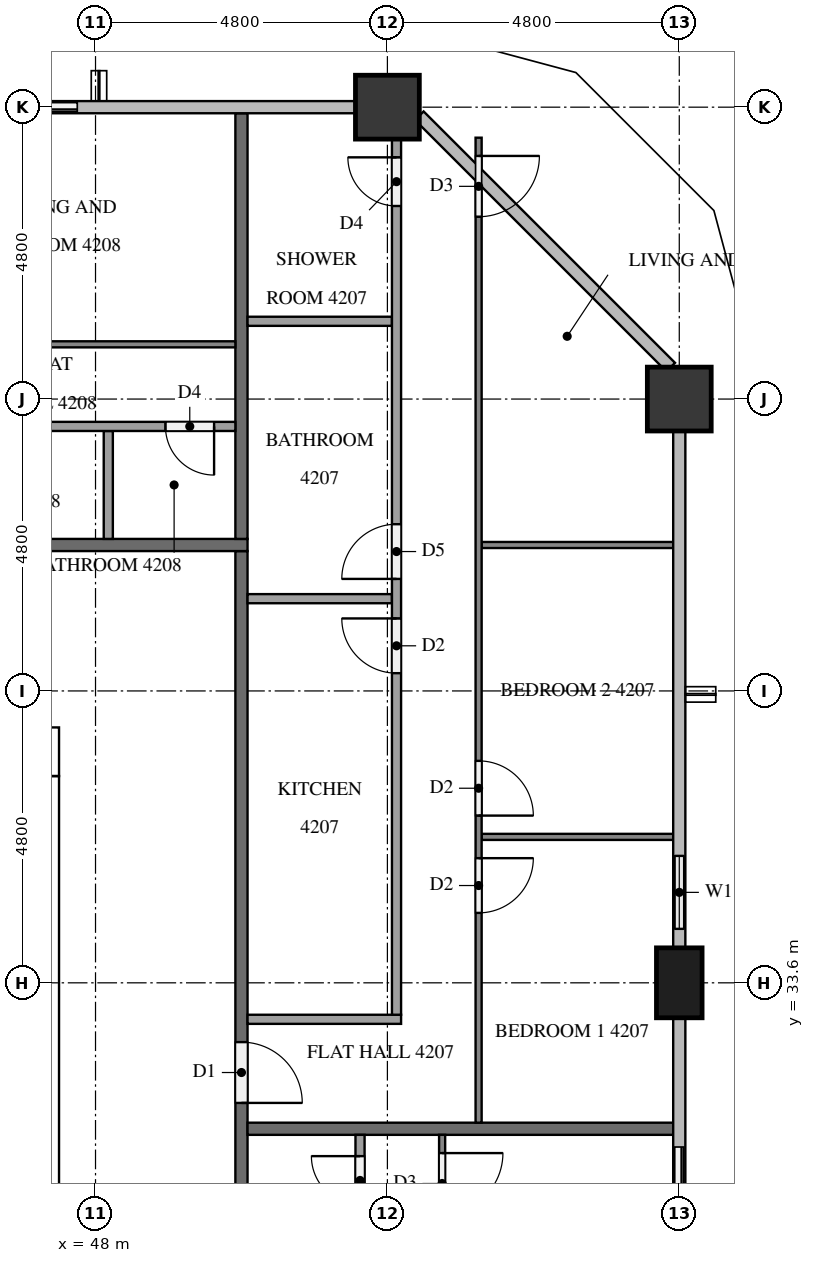
"""IFC4 building model, lengths in metres.
Left out: names, types, materials, properties, quantities, classifications, styles, units other than length and angle.
Written with IfcOpenShell. Run it as: python <this file> out.ifc"""

import sys

from ifc_helpers import new_model, si_unit, direction, frame, frame_2d, origin, origin_2d, place, context, subcontext, project, spatial, rectangle, extrude, element, fill, save


model = new_model("IFC4")
c1 = context("Model", 3, precision=1e-05, world=origin(), true_north=direction((0.0, 1.0)))
c2 = subcontext(c1, "Body", "Model", "MODEL_VIEW")
j1 = project(units=[si_unit("LENGTHUNIT", "METRE"), si_unit("PLANEANGLEUNIT", "RADIAN")], contexts=[c1])
p1 = place(None, origin())
s1 = spatial("IfcSite", under=j1, at=p1, CompositionType="ELEMENT")
p2 = place(p1, origin())
s2 = spatial("IfcBuilding", under=s1, at=p2, CompositionType="ELEMENT")
p3 = place(p2, frame((0.0, 0.0, 163.0)))
s3 = spatial("IfcBuildingStorey", under=s2, at=p3, CompositionType="ELEMENT", Elevation=163.0)
p4 = place(p3, frame((15.0, 37.4, 0.0), z_axis=(0.0, 0.0, 1.0), x_axis=(1.0, 0.0, 0.0)))
e1 = element("IfcWall", 1, at=p4, inside=s3, PredefinedType="SHEAR", context=c2, shape_type="SweptSolid", body=[
    extrude(rectangle(XDim=32.4, YDim=0.8, at=frame_2d((16.2, 0.0))), origin(), (0.0, 0.0, 1.0), 3.2),
])
p5 = place(p4, frame((15.3, 0.0, 0.0)))
e2 = element("IfcOpeningElement", 2, at=p5, cuts=e1, PredefinedType="OPENING", context=c2, shape_type="SweptSolid", body=[
    extrude(rectangle(XDim=1.8, YDim=2.1, at=frame_2d((0.9, 1.05))), frame((0.0, 0.41, 0.0), z_axis=(0.0, -1.0, 0.0), x_axis=(1.0, 0.0, 0.0)), (0.0, 0.0, 1.0), 0.82),
])
p6 = place(p4, frame((1.51, 0.0, 0.0)))
e3 = element("IfcOpeningElement", 3, at=p6, cuts=e1, PredefinedType="OPENING", context=c2, shape_type="SweptSolid", body=[
    extrude(rectangle(XDim=1.0, YDim=2.1, at=frame_2d((0.5, 1.05))), frame((0.0, 0.41, 0.0), z_axis=(0.0, -1.0, 0.0), x_axis=(1.0, 0.0, 0.0)), (0.0, 0.0, 1.0), 0.82),
])
p7 = place(p4, frame((5.11, 0.0, 0.0)))
e4 = element("IfcOpeningElement", 4, at=p7, cuts=e1, PredefinedType="OPENING", context=c2, shape_type="SweptSolid", body=[
    extrude(rectangle(XDim=1.0, YDim=2.1, at=frame_2d((0.5, 1.05))), frame((0.0, 0.41, 0.0), z_axis=(0.0, -1.0, 0.0), x_axis=(1.0, 0.0, 0.0)), (0.0, 0.0, 1.0), 0.82),
])
p8 = place(p3, frame((47.0, 15.8, 0.0), z_axis=(0.0, 0.0, 1.0), x_axis=(0.0, 1.0, 0.0)))
e5 = element("IfcWall", 5, at=p8, inside=s3, PredefinedType="SHEAR", context=c2, shape_type="SweptSolid", body=[
    extrude(rectangle(XDim=21.2, YDim=0.8, at=frame_2d((10.6, 0.0))), origin(), (0.0, 0.0, 1.0), 3.2),
])
p9 = place(p8, frame((10.3, 0.0, 0.0)))
e6 = element("IfcOpeningElement", 6, at=p9, cuts=e5, PredefinedType="OPENING", context=c2, shape_type="SweptSolid", body=[
    extrude(rectangle(XDim=1.2, YDim=2.1, at=frame_2d((0.6, 1.05))), frame((0.0, 0.41, 0.0), z_axis=(0.0, -1.0, 0.0), x_axis=(1.0, 0.0, 0.0)), (0.0, 0.0, 1.0), 0.82),
])
p10 = place(p3, frame((57.6, 33.6, 0.0), z_axis=(0.0, 0.0, 1.0), x_axis=(0.0, 1.0, 0.0)))
e7 = element("IfcColumn", 7, at=p10, inside=s3, PredefinedType="COLUMN", context=c2, shape_type="SweptSolid", body=[
    extrude(rectangle(XDim=1.15, YDim=0.75, at=origin_2d()), origin(), (0.0, 0.0, 1.0), 3.2),
])
for number, where, z_axis, x_axis in (
    (8, (57.6, 43.2, 0.0), (0.0, 0.0, 1.0), (1.0, 0.0, 0.0)),
    (9, (52.8, 48.0, 0.0), (0.0, 0.0, 1.0), (1.0, 0.0, 0.0)),
):
    element("IfcColumn", number, at=place(p3, frame(where, z_axis=z_axis, x_axis=x_axis)), inside=s3, PredefinedType="COLUMN", context=c2, shape_type="SweptSolid", body=[
        extrude(rectangle(XDim=1.05, YDim=1.05, at=origin_2d()), origin(), (0.0, 0.0, 1.0), 3.2),
    ])
p11 = place(p3, frame((57.6, 28.8, 0.0), z_axis=(0.0, 0.0, 1.0), x_axis=(0.0, 1.0, 0.0)))
e10 = element("IfcWall", 10, at=p11, inside=s3, PredefinedType="SOLIDWALL", context=c2, shape_type="SweptSolid", body=[
    extrude(rectangle(XDim=2.4, YDim=0.15, at=frame_2d((1.2, 0.0))), origin(), (0.0, 0.0, 1.0), 3.2),
])
p12 = place(p11, frame((0.3, 0.0, 0.0)))
e11 = element("IfcOpeningElement", 11, at=p12, cuts=e10, PredefinedType="OPENING", context=c2, shape_type="SweptSolid", body=[
    extrude(rectangle(XDim=1.8, YDim=2.4, at=frame_2d((0.9, 1.2))), frame((0.0, 0.085, 0.0), z_axis=(0.0, -1.0, 0.0), x_axis=(1.0, 0.0, 0.0)), (0.0, 0.0, 1.0), 0.17),
])
p13 = place(p3, frame((57.6, 34.175, 0.0), z_axis=(0.0, 0.0, 1.0), x_axis=(0.0, 1.0, 0.0)))
e12 = element("IfcWall", 12, at=p13, inside=s3, PredefinedType="SOLIDWALL", context=c2, shape_type="SweptSolid", body=[
    extrude(rectangle(XDim=1.825, YDim=0.15, at=frame_2d((0.913, 0.0))), origin(), (0.0, 0.0, 1.0), 3.2),
])
p14 = place(p13, frame((0.312, 0.0, 0.9)))
e13 = element("IfcOpeningElement", 13, at=p14, cuts=e12, PredefinedType="OPENING", context=c2, shape_type="SweptSolid", body=[
    extrude(rectangle(XDim=1.2, YDim=1.4, at=frame_2d((0.6, 0.7))), frame((0.0, 0.085, 0.0), z_axis=(0.0, -1.0, 0.0), x_axis=(1.0, 0.0, 0.0)), (0.0, 0.0, 1.0), 0.17),
])
p15 = place(p3, frame((48.0, 48.0, 0.0), z_axis=(0.0, 0.0, 1.0), x_axis=(-1.0, 0.0, 0.0)))
e14 = element("IfcWall", 14, at=p15, inside=s3, PredefinedType="SOLIDWALL", context=c2, shape_type="SweptSolid", body=[
    extrude(rectangle(XDim=2.4, YDim=0.15, at=frame_2d((1.2, 0.0))), origin(), (0.0, 0.0, 1.0), 3.2),
])
p16 = place(p15, frame((0.3, 0.0, 0.0)))
e15 = element("IfcOpeningElement", 15, at=p16, cuts=e14, PredefinedType="OPENING", context=c2, shape_type="SweptSolid", body=[
    extrude(rectangle(XDim=1.8, YDim=2.4, at=frame_2d((0.9, 1.2))), frame((0.0, 0.085, 0.0), z_axis=(0.0, -1.0, 0.0), x_axis=(1.0, 0.0, 0.0)), (0.0, 0.0, 1.0), 0.17),
])
p17 = place(p3, frame((50.4, 40.7, 0.0), z_axis=(0.0, 0.0, 1.0), x_axis=(0.0, -1.0, 0.0)))
e16 = element("IfcWall", 16, at=p17, inside=s3, PredefinedType="PARTITIONING", context=c2, shape_type="SweptSolid", body=[
    extrude(rectangle(XDim=28.6, YDim=0.2, at=frame_2d((14.3, 0.0))), origin(), (0.0, 0.0, 1.0), 3.2),
])
p18 = place(p17, frame((19.525, 0.0, 0.0)))
e17 = element("IfcOpeningElement", 17, at=p18, cuts=e16, PredefinedType="OPENING", context=c2, shape_type="SweptSolid", body=[
    extrude(rectangle(XDim=1.0, YDim=2.1, at=frame_2d((0.5, 1.05))), frame((0.0, 0.11, 0.0), z_axis=(0.0, -1.0, 0.0), x_axis=(1.0, 0.0, 0.0)), (0.0, 0.0, 1.0), 0.22),
])
p19 = place(p17, frame((17.675, 0.0, 0.0)))
e18 = element("IfcOpeningElement", 18, at=p19, cuts=e16, PredefinedType="OPENING", context=c2, shape_type="SweptSolid", body=[
    extrude(rectangle(XDim=1.0, YDim=2.1, at=frame_2d((0.5, 1.05))), frame((0.0, 0.11, 0.0), z_axis=(0.0, -1.0, 0.0), x_axis=(1.0, 0.0, 0.0)), (0.0, 0.0, 1.0), 0.22),
])
p20 = place(p17, frame((8.075, 0.0, 0.0)))
e19 = element("IfcOpeningElement", 19, at=p20, cuts=e16, PredefinedType="OPENING", context=c2, shape_type="SweptSolid", body=[
    extrude(rectangle(XDim=1.0, YDim=2.1, at=frame_2d((0.5, 1.05))), frame((0.0, 0.11, 0.0), z_axis=(0.0, -1.0, 0.0), x_axis=(1.0, 0.0, 0.0)), (0.0, 0.0, 1.0), 0.22),
])
p21 = place(p3, frame((11.9, 40.8, 0.0), z_axis=(0.0, 0.0, 1.0), x_axis=(1.0, 0.0, 0.0)))
e20 = element("IfcWall", 20, at=p21, inside=s3, PredefinedType="PARTITIONING", context=c2, shape_type="SweptSolid", body=[
    extrude(rectangle(XDim=38.6, YDim=0.2, at=frame_2d((19.3, 0.0))), origin(), (0.0, 0.0, 1.0), 3.2),
])
p22 = place(p21, frame((31.725, 0.0, 0.0)))
e21 = element("IfcOpeningElement", 21, at=p22, cuts=e20, PredefinedType="OPENING", context=c2, shape_type="SweptSolid", body=[
    extrude(rectangle(XDim=1.0, YDim=2.1, at=frame_2d((0.5, 1.05))), frame((0.0, 0.11, 0.0), z_axis=(0.0, -1.0, 0.0), x_axis=(1.0, 0.0, 0.0)), (0.0, 0.0, 1.0), 0.22),
])
p23 = place(p21, frame((17.325, 0.0, 0.0)))
e22 = element("IfcOpeningElement", 22, at=p23, cuts=e20, PredefinedType="OPENING", context=c2, shape_type="SweptSolid", body=[
    extrude(rectangle(XDim=1.0, YDim=2.1, at=frame_2d((0.5, 1.05))), frame((0.0, 0.11, 0.0), z_axis=(0.0, -1.0, 0.0), x_axis=(1.0, 0.0, 0.0)), (0.0, 0.0, 1.0), 0.22),
])
p24 = place(p21, frame((0.525, 0.0, 0.0)))
e23 = element("IfcOpeningElement", 23, at=p24, cuts=e20, PredefinedType="OPENING", context=c2, shape_type="SweptSolid", body=[
    extrude(rectangle(XDim=1.0, YDim=2.1, at=frame_2d((0.5, 1.05))), frame((0.0, 0.11, 0.0), z_axis=(0.0, -1.0, 0.0), x_axis=(1.0, 0.0, 0.0)), (0.0, 0.0, 1.0), 0.22),
])
for number, where, z_axis, x_axis in (
    (24, (50.5, 31.2, 0.0), (0.0, 0.0, 1.0), (1.0, 0.0, 0.0)),
    (25, (50.4, 40.9, 0.0), (0.0, 0.0, 1.0), (0.0, 1.0, 0.0)),
):
    element("IfcWall", number, at=place(p3, frame(where, z_axis=z_axis, x_axis=x_axis)), inside=s3, PredefinedType="PARTITIONING", context=c2, shape_type="SweptSolid", body=[
        extrude(rectangle(XDim=7.0, YDim=0.2, at=frame_2d((3.5, 0.0))), origin(), (0.0, 0.0, 1.0), 3.2),
    ])
p25 = place(p3, frame((53.7, 31.1, 0.0), z_axis=(0.0, 0.0, 1.0), x_axis=(0.0, -1.0, 0.0)))
e26 = element("IfcWall", 26, at=p25, inside=s3, PredefinedType="PARTITIONING", context=c2, shape_type="SweptSolid", body=[
    extrude(rectangle(XDim=9.4, YDim=0.1, at=frame_2d((4.7, 0.0))), origin(), (0.0, 0.0, 1.0), 3.2),
])
p26 = place(p25, frame((8.2, 0.0, 0.0)))
e27 = element("IfcOpeningElement", 27, at=p26, cuts=e26, PredefinedType="OPENING", context=c2, shape_type="SweptSolid", body=[
    extrude(rectangle(XDim=0.9, YDim=2.1, at=frame_2d((0.45, 1.05))), frame((0.0, 0.06, 0.0), z_axis=(0.0, -1.0, 0.0), x_axis=(1.0, 0.0, 0.0)), (0.0, 0.0, 1.0), 0.12),
])
p27 = place(p25, frame((0.3, 0.0, 0.0)))
e28 = element("IfcOpeningElement", 28, at=p27, cuts=e26, PredefinedType="OPENING", context=c2, shape_type="SweptSolid", body=[
    extrude(rectangle(XDim=1.0, YDim=2.1, at=frame_2d((0.5, 1.05))), frame((0.0, 0.06, 0.0), z_axis=(0.0, -1.0, 0.0), x_axis=(1.0, 0.0, 0.0)), (0.0, 0.0, 1.0), 0.12),
])
p28 = place(p3, frame((52.35, 23.475, 0.0), z_axis=(0.0, 0.0, 1.0), x_axis=(0.0, 1.0, 0.0)))
e29 = element("IfcWall", 29, at=p28, inside=s3, PredefinedType="PARTITIONING", context=c2, shape_type="SweptSolid", body=[
    extrude(rectangle(XDim=7.625, YDim=0.15, at=frame_2d((3.812, 0.0))), origin(), (0.0, 0.0, 1.0), 3.2),
])
p29 = place(p28, frame((0.3, 0.0, 0.0)))
e30 = element("IfcOpeningElement", 30, at=p29, cuts=e29, PredefinedType="OPENING", context=c2, shape_type="SweptSolid", body=[
    extrude(rectangle(XDim=0.9, YDim=2.1, at=frame_2d((0.45, 1.05))), frame((0.0, 0.085, 0.0), z_axis=(0.0, -1.0, 0.0), x_axis=(1.0, 0.0, 0.0)), (0.0, 0.0, 1.0), 0.17),
])
p30 = place(p28, frame((6.475, 0.0, 0.0)))
e31 = element("IfcOpeningElement", 31, at=p30, cuts=e29, PredefinedType="OPENING", context=c2, shape_type="SweptSolid", body=[
    extrude(rectangle(XDim=0.8, YDim=2.1, at=frame_2d((0.4, 1.05))), frame((0.0, 0.085, 0.0), z_axis=(0.0, -1.0, 0.0), x_axis=(1.0, 0.0, 0.0)), (0.0, 0.0, 1.0), 0.17),
])
for number, where, z_axis, x_axis in (
    (32, (54.35, 36.0, 0.0), (0.0, 0.0, 1.0), (1.0, 0.0, 0.0)),
    (33, (54.35, 40.8, 0.0), (0.0, 0.0, 1.0), (1.0, 0.0, 0.0)),
):
    element("IfcWall", number, at=place(p3, frame(where, z_axis=z_axis, x_axis=x_axis)), inside=s3, PredefinedType="PARTITIONING", context=c2, shape_type="SweptSolid", body=[
        extrude(rectangle(XDim=3.15, YDim=0.1, at=frame_2d((1.575, 0.0))), origin(), (0.0, 0.0, 1.0), 3.2),
    ])
p31 = place(p3, frame((54.3, 47.498, 0.0), z_axis=(0.0, 0.0, 1.0), x_axis=(0.0, -1.0, 0.0)))
e34 = element("IfcWall", 34, at=p31, inside=s3, PredefinedType="PARTITIONING", context=c2, shape_type="SweptSolid", body=[
    extrude(rectangle(XDim=16.198, YDim=0.1, at=frame_2d((8.099, 0.0))), origin(), (0.0, 0.0, 1.0), 3.2),
])
p32 = place(p31, frame((11.848, 0.0, 0.0)))
e35 = element("IfcOpeningElement", 35, at=p32, cuts=e34, PredefinedType="OPENING", context=c2, shape_type="SweptSolid", body=[
    extrude(rectangle(XDim=0.9, YDim=2.1, at=frame_2d((0.45, 1.05))), frame((0.0, 0.06, 0.0), z_axis=(0.0, -1.0, 0.0), x_axis=(1.0, 0.0, 0.0)), (0.0, 0.0, 1.0), 0.12),
])
p33 = place(p31, frame((10.248, 0.0, 0.0)))
e36 = element("IfcOpeningElement", 36, at=p33, cuts=e34, PredefinedType="OPENING", context=c2, shape_type="SweptSolid", body=[
    extrude(rectangle(XDim=0.9, YDim=2.1, at=frame_2d((0.45, 1.05))), frame((0.0, 0.06, 0.0), z_axis=(0.0, -1.0, 0.0), x_axis=(1.0, 0.0, 0.0)), (0.0, 0.0, 1.0), 0.12),
])
p34 = place(p31, frame((0.3, 0.0, 0.0)))
e37 = element("IfcOpeningElement", 37, at=p34, cuts=e34, PredefinedType="OPENING", context=c2, shape_type="SweptSolid", body=[
    extrude(rectangle(XDim=1.0, YDim=2.1, at=frame_2d((0.5, 1.05))), frame((0.0, 0.06, 0.0), z_axis=(0.0, -1.0, 0.0), x_axis=(1.0, 0.0, 0.0)), (0.0, 0.0, 1.0), 0.12),
])
for number, where, z_axis, x_axis in (
    (38, (50.5, 39.917, 0.0), (0.0, 0.0, 1.0), (1.0, 0.0, 0.0)),
    (39, (50.5, 44.479, 0.0), (0.0, 0.0, 1.0), (1.0, 0.0, 0.0)),
):
    element("IfcWall", number, at=place(p3, frame(where, z_axis=z_axis, x_axis=x_axis)), inside=s3, PredefinedType="PARTITIONING", context=c2, shape_type="SweptSolid", body=[
        extrude(rectangle(XDim=2.375, YDim=0.15, at=frame_2d((1.188, 0.0))), origin(), (0.0, 0.0, 1.0), 3.2),
    ])
p35 = place(p3, frame((50.5, 33.0, 0.0), z_axis=(0.0, 0.0, 1.0), x_axis=(1.0, 0.0, 0.0)))
e40 = element("IfcWall", 40, at=p35, inside=s3, PredefinedType="PARTITIONING", context=c2, shape_type="SweptSolid", body=[
    extrude(rectangle(XDim=2.525, YDim=0.15, at=frame_2d((1.262, 0.0))), origin(), (0.0, 0.0, 1.0), 3.2),
])
p36 = place(p3, frame((52.95, 33.075, 0.0), z_axis=(0.0, 0.0, 1.0), x_axis=(0.0, 1.0, 0.0)))
e41 = element("IfcWall", 41, at=p36, inside=s3, PredefinedType="PARTITIONING", context=c2, shape_type="SweptSolid", body=[
    extrude(rectangle(XDim=14.4, YDim=0.15, at=frame_2d((7.2, 0.0))), origin(), (0.0, 0.0, 1.0), 3.2),
])
p37 = place(p36, frame((5.617, 0.0, 0.0)))
e42 = element("IfcOpeningElement", 42, at=p37, cuts=e41, PredefinedType="OPENING", context=c2, shape_type="SweptSolid", body=[
    extrude(rectangle(XDim=0.9, YDim=2.1, at=frame_2d((0.45, 1.05))), frame((0.0, 0.085, 0.0), z_axis=(0.0, -1.0, 0.0), x_axis=(1.0, 0.0, 0.0)), (0.0, 0.0, 1.0), 0.17),
])
p38 = place(p36, frame((7.167, 0.0, 0.0)))
e43 = element("IfcOpeningElement", 43, at=p38, cuts=e41, PredefinedType="OPENING", context=c2, shape_type="SweptSolid", body=[
    extrude(rectangle(XDim=0.9, YDim=2.1, at=frame_2d((0.45, 1.05))), frame((0.0, 0.085, 0.0), z_axis=(0.0, -1.0, 0.0), x_axis=(1.0, 0.0, 0.0)), (0.0, 0.0, 1.0), 0.17),
])
p39 = place(p36, frame((13.3, 0.0, 0.0)))
e44 = element("IfcOpeningElement", 44, at=p39, cuts=e41, PredefinedType="OPENING", context=c2, shape_type="SweptSolid", body=[
    extrude(rectangle(XDim=0.8, YDim=2.1, at=frame_2d((0.4, 1.05))), frame((0.0, 0.085, 0.0), z_axis=(0.0, -1.0, 0.0), x_axis=(1.0, 0.0, 0.0)), (0.0, 0.0, 1.0), 0.17),
])
p40 = place(p3, frame((43.3, 44.1, 0.0), z_axis=(0.0, 0.0, 1.0), x_axis=(1.0, 0.0, 0.0)))
e45 = element("IfcWall", 45, at=p40, inside=s3, PredefinedType="PARTITIONING", context=c2, shape_type="SweptSolid", body=[
    extrude(rectangle(XDim=7.0, YDim=0.1, at=frame_2d((3.5, 0.0))), origin(), (0.0, 0.0, 1.0), 3.2),
])
p41 = place(p40, frame((0.3, 0.0, 0.0)))
e46 = element("IfcOpeningElement", 46, at=p41, cuts=e45, PredefinedType="OPENING", context=c2, shape_type="SweptSolid", body=[
    extrude(rectangle(XDim=1.0, YDim=2.1, at=frame_2d((0.5, 1.05))), frame((0.0, 0.06, 0.0), z_axis=(0.0, -1.0, 0.0), x_axis=(1.0, 0.0, 0.0)), (0.0, 0.0, 1.0), 0.12),
])
p42 = place(p3, frame((48.21, 40.9, 0.0), z_axis=(0.0, 0.0, 1.0), x_axis=(0.0, 1.0, 0.0)))
e47 = element("IfcWall", 47, at=p42, inside=s3, PredefinedType="PARTITIONING", context=c2, shape_type="SweptSolid", body=[
    extrude(rectangle(XDim=1.775, YDim=0.15, at=frame_2d((0.888, 0.0))), origin(), (0.0, 0.0, 1.0), 3.2),
])
p43 = place(p3, frame((50.3, 42.75, 0.0), z_axis=(0.0, 0.0, 1.0), x_axis=(-1.0, 0.0, 0.0)))
e48 = element("IfcWall", 48, at=p43, inside=s3, PredefinedType="PARTITIONING", context=c2, shape_type="SweptSolid", body=[
    extrude(rectangle(XDim=5.225, YDim=0.15, at=frame_2d((2.613, 0.0))), origin(), (0.0, 0.0, 1.0), 3.2),
])
p44 = place(p43, frame((4.025, 0.0, 0.0)))
e49 = element("IfcOpeningElement", 49, at=p44, cuts=e48, PredefinedType="OPENING", context=c2, shape_type="SweptSolid", body=[
    extrude(rectangle(XDim=0.9, YDim=2.1, at=frame_2d((0.45, 1.05))), frame((0.0, 0.085, 0.0), z_axis=(0.0, -1.0, 0.0), x_axis=(1.0, 0.0, 0.0)), (0.0, 0.0, 1.0), 0.17),
])
p45 = place(p43, frame((0.35, 0.0, 0.0)))
e50 = element("IfcOpeningElement", 50, at=p45, cuts=e48, PredefinedType="OPENING", context=c2, shape_type="SweptSolid", body=[
    extrude(rectangle(XDim=0.8, YDim=2.1, at=frame_2d((0.4, 1.05))), frame((0.0, 0.085, 0.0), z_axis=(0.0, -1.0, 0.0), x_axis=(1.0, 0.0, 0.0)), (0.0, 0.0, 1.0), 0.17),
])
p46 = place(p12, origin())
e51 = element("IfcDoor", 51, at=p46, inside=s3, OperationType="SLIDING_TO_RIGHT", PredefinedType="DOOR", context=c2, shape_type="SweptSolid", body=[
    extrude(rectangle(XDim=1.8, YDim=2.4, at=frame_2d((0.9, 1.2))), frame((0.0, 0.025, 0.0), z_axis=(0.0, -1.0, 0.0), x_axis=(1.0, 0.0, 0.0)), (0.0, 0.0, 1.0), 0.05),
])
fill(e11, e51)
p47 = place(p14, origin())
e52 = element("IfcWindow", 52, at=p47, inside=s3, PartitioningType="SINGLE_PANEL", PredefinedType="WINDOW", context=c2, shape_type="SweptSolid", body=[
    extrude(rectangle(XDim=1.2, YDim=1.4, at=frame_2d((0.6, 0.7))), frame((0.0, 0.03, 0.0), z_axis=(0.0, -1.0, 0.0), x_axis=(1.0, 0.0, 0.0)), (0.0, 0.0, 1.0), 0.06),
])
fill(e13, e52)
p48 = place(p16, origin())
e53 = element("IfcDoor", 53, at=p48, inside=s3, OperationType="SLIDING_TO_LEFT", PredefinedType="DOOR", context=c2, shape_type="SweptSolid", body=[
    extrude(rectangle(XDim=1.8, YDim=2.4, at=frame_2d((0.9, 1.2))), frame((0.0, 0.025, 0.0), z_axis=(0.0, -1.0, 0.0), x_axis=(1.0, 0.0, 0.0)), (0.0, 0.0, 1.0), 0.05),
])
fill(e15, e53)
p49 = place(p20, origin())
e54 = element("IfcDoor", 54, at=p49, inside=s3, OperationType="SINGLE_SWING_RIGHT", PredefinedType="DOOR", context=c2, shape_type="SweptSolid", body=[
    extrude(rectangle(XDim=1.0, YDim=2.1, at=frame_2d((0.5, 1.05))), frame((0.0, 0.025, 0.0), z_axis=(0.0, -1.0, 0.0), x_axis=(1.0, 0.0, 0.0)), (0.0, 0.0, 1.0), 0.05),
])
fill(e19, e54)
p50 = place(p27, origin())
e55 = element("IfcDoor", 55, at=p50, inside=s3, OperationType="SINGLE_SWING_LEFT", PredefinedType="DOOR", context=c2, shape_type="SweptSolid", body=[
    extrude(rectangle(XDim=1.0, YDim=2.1, at=frame_2d((0.5, 1.05))), frame((0.0, 0.025, 0.0), z_axis=(0.0, -1.0, 0.0), x_axis=(1.0, 0.0, 0.0)), (0.0, 0.0, 1.0), 0.05),
])
fill(e28, e55)
p51 = place(p30, origin())
e56 = element("IfcDoor", 56, at=p51, inside=s3, OperationType="SINGLE_SWING_RIGHT", PredefinedType="DOOR", context=c2, shape_type="SweptSolid", body=[
    extrude(rectangle(XDim=0.8, YDim=2.1, at=frame_2d((0.4, 1.05))), frame((0.0, 0.025, 0.0), z_axis=(0.0, -1.0, 0.0), x_axis=(1.0, 0.0, 0.0)), (0.0, 0.0, 1.0), 0.05),
])
fill(e31, e56)
p52 = place(p32, origin())
e57 = element("IfcDoor", 57, at=p52, inside=s3, OperationType="SINGLE_SWING_LEFT", PredefinedType="DOOR", context=c2, shape_type="SweptSolid", body=[
    extrude(rectangle(XDim=0.9, YDim=2.1, at=frame_2d((0.45, 1.05))), frame((0.0, 0.025, 0.0), z_axis=(0.0, -1.0, 0.0), x_axis=(1.0, 0.0, 0.0)), (0.0, 0.0, 1.0), 0.05),
])
fill(e35, e57)
p53 = place(p33, origin())
e58 = element("IfcDoor", 58, at=p53, inside=s3, OperationType="SINGLE_SWING_RIGHT", PredefinedType="DOOR", context=c2, shape_type="SweptSolid", body=[
    extrude(rectangle(XDim=0.9, YDim=2.1, at=frame_2d((0.45, 1.05))), frame((0.0, 0.025, 0.0), z_axis=(0.0, -1.0, 0.0), x_axis=(1.0, 0.0, 0.0)), (0.0, 0.0, 1.0), 0.05),
])
fill(e36, e58)
p54 = place(p34, origin())
e59 = element("IfcDoor", 59, at=p54, inside=s3, OperationType="SINGLE_SWING_LEFT", PredefinedType="DOOR", context=c2, shape_type="SweptSolid", body=[
    extrude(rectangle(XDim=1.0, YDim=2.1, at=frame_2d((0.5, 1.05))), frame((0.0, 0.025, 0.0), z_axis=(0.0, -1.0, 0.0), x_axis=(1.0, 0.0, 0.0)), (0.0, 0.0, 1.0), 0.05),
])
fill(e37, e59)
p55 = place(p37, origin())
e60 = element("IfcDoor", 60, at=p55, inside=s3, OperationType="SINGLE_SWING_RIGHT", PredefinedType="DOOR", context=c2, shape_type="SweptSolid", body=[
    extrude(rectangle(XDim=0.9, YDim=2.1, at=frame_2d((0.45, 1.05))), frame((0.0, 0.025, 0.0), z_axis=(0.0, -1.0, 0.0), x_axis=(1.0, 0.0, 0.0)), (0.0, 0.0, 1.0), 0.05),
])
fill(e42, e60)
p56 = place(p38, origin())
e61 = element("IfcDoor", 61, at=p56, inside=s3, OperationType="SINGLE_SWING_LEFT", PredefinedType="DOOR", context=c2, shape_type="SweptSolid", body=[
    extrude(rectangle(XDim=0.9, YDim=2.1, at=frame_2d((0.45, 1.05))), frame((0.0, 0.025, 0.0), z_axis=(0.0, -1.0, 0.0), x_axis=(1.0, 0.0, 0.0)), (0.0, 0.0, 1.0), 0.05),
])
fill(e43, e61)
p57 = place(p39, origin())
e62 = element("IfcDoor", 62, at=p57, inside=s3, OperationType="SINGLE_SWING_RIGHT", PredefinedType="DOOR", context=c2, shape_type="SweptSolid", body=[
    extrude(rectangle(XDim=0.8, YDim=2.1, at=frame_2d((0.4, 1.05))), frame((0.0, 0.025, 0.0), z_axis=(0.0, -1.0, 0.0), x_axis=(1.0, 0.0, 0.0)), (0.0, 0.0, 1.0), 0.05),
])
fill(e44, e62)
p58 = place(p45, origin())
e63 = element("IfcDoor", 63, at=p58, inside=s3, OperationType="SINGLE_SWING_LEFT", PredefinedType="DOOR", context=c2, shape_type="SweptSolid", body=[
    extrude(rectangle(XDim=0.8, YDim=2.1, at=frame_2d((0.4, 1.05))), frame((0.0, 0.025, 0.0), z_axis=(0.0, -1.0, 0.0), x_axis=(1.0, 0.0, 0.0)), (0.0, 0.0, 1.0), 0.05),
])
fill(e50, e63)
save(model, sys.argv[1])
